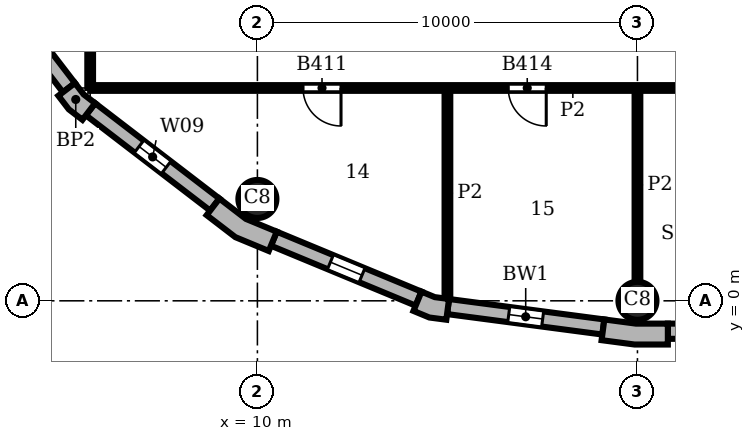
"""IFC4 building model, lengths in metres.
Left out: names, types, materials, properties, quantities, classifications, styles, units other than length and angle.
Written with IfcOpenShell. Run it as: python <this file> out.ifc"""

import sys

from ifc_helpers import new_model, si_unit, direction, frame, frame_2d, origin, origin_2d, place, context, subcontext, project, spatial, polyline, rectangle, circle, outline, extrude, element, fill, save


model = new_model("IFC4")
c1 = context("Model", 3, precision=1e-05, world=origin(), true_north=direction((0.0, 1.0)))
c2 = subcontext(c1, "Body", "Model", "MODEL_VIEW")
j1 = project(units=[si_unit("LENGTHUNIT", "METRE"), si_unit("PLANEANGLEUNIT", "RADIAN")], contexts=[c1])
p1 = place(None, origin())
s1 = spatial("IfcSite", under=j1, at=p1, CompositionType="ELEMENT")
p2 = place(p1, origin())
s2 = spatial("IfcBuilding", under=s1, at=p2, CompositionType="ELEMENT")
p3 = place(p2, frame((0.0, 0.0, 170.7)))
s3 = spatial("IfcBuildingStorey", under=s2, at=p3, CompositionType="ELEMENT", Elevation=170.7)
for number, where, z_axis, x_axis in (
    (1, (20.0, 0.0, 0.0), (0.0, 0.0, 1.0), (1.0, 0.0, 0.0)),
    (2, (10.0, 2.679, 0.0), (0.0, 0.0, 1.0), (1.0, 0.0, 0.0)),
):
    element("IfcColumn", number, at=place(p3, frame(where, z_axis=z_axis, x_axis=x_axis)), inside=s3, PredefinedType="COLUMN", context=c2, shape_type="SweptSolid", body=[
        extrude(circle(Radius=0.5, at=origin_2d()), origin(), (0.0, 0.0, 1.0), 3.9),
    ])
p4 = place(p3, origin())
e3 = element("IfcWall", 3, at=p4, inside=s3, PredefinedType="SOLIDWALL", context=c2, shape_type="SweptSolid", body=[
    extrude(outline(polyline([(19.076, -0.887), (19.057, -1.036), (19.925, -1.15), (20.8, -1.15), (20.8, -1.0), (20.8, -0.6), (19.961, -0.6), (19.128, -0.49), (19.076, -0.887)])), origin(), (0.0, 0.0, 1.0), 3.9),
])
e4 = element("IfcWall", 4, at=p4, inside=s3, PredefinedType="SOLIDWALL", context=c2, shape_type="SweptSolid", body=[
    extrude(outline(polyline([(4.882, 5.487), (4.763, 5.396), (5.038, 5.038), (5.396, 4.763), (5.487, 4.882), (5.731, 5.199), (5.43, 5.43), (5.199, 5.731), (4.882, 5.487)])), origin(), (0.0, 0.0, 1.0), 3.9),
])
e5 = element("IfcWall", 5, at=p4, inside=s3, PredefinedType="SOLIDWALL", context=c2, shape_type="SweptSolid", body=[
    extrude(outline(polyline([(8.757, 2.373), (8.665, 2.254), (9.42, 1.675), (10.299, 1.311), (10.356, 1.449), (10.51, 1.819), (9.698, 2.155), (9.0, 2.69), (8.757, 2.373)])), origin(), (0.0, 0.0, 1.0), 3.9),
])
e6 = element("IfcWall", 6, at=p4, inside=s3, PredefinedType="SOLIDWALL", context=c2, shape_type="SweptSolid", body=[
    extrude(outline(polyline([(14.164, -0.128), (14.106, -0.266), (14.523, -0.439), (14.971, -0.498), (14.99, -0.349), (15.043, 0.047), (14.667, 0.097), (14.317, 0.242), (14.164, -0.128)])), origin(), (0.0, 0.0, 1.0), 3.9),
])
p5 = place(p3, frame((20.8, -0.8, 0.0), z_axis=(0.0, 0.0, 1.0), x_axis=(1.0, 0.0, 0.0)))
e7 = element("IfcWall", 7, at=p5, inside=s3, PredefinedType="SOLIDWALL", context=c2, shape_type="SweptSolid", body=[
    extrude(rectangle(XDim=38.4, YDim=0.4, at=frame_2d((19.2, 0.0))), origin(), (0.0, 0.0, 1.0), 3.9),
])
p6 = place(p5, frame((3.75, 0.0, 0.9)))
e8 = element("IfcOpeningElement", 8, at=p6, cuts=e7, PredefinedType="OPENING", context=c2, shape_type="SweptSolid", body=[
    extrude(rectangle(XDim=0.9, YDim=2.35, at=frame_2d((0.45, 1.175))), frame((0.0, 0.21, 0.0), z_axis=(0.0, -1.0, 0.0), x_axis=(1.0, 0.0, 0.0)), (0.0, 0.0, 1.0), 0.42),
])
p7 = place(p5, frame((13.75, 0.0, 0.9)))
e9 = element("IfcOpeningElement", 9, at=p7, cuts=e7, PredefinedType="OPENING", context=c2, shape_type="SweptSolid", body=[
    extrude(rectangle(XDim=0.9, YDim=2.35, at=frame_2d((0.45, 1.175))), frame((0.0, 0.21, 0.0), z_axis=(0.0, -1.0, 0.0), x_axis=(1.0, 0.0, 0.0)), (0.0, 0.0, 1.0), 0.42),
])
p8 = place(p5, frame((23.75, 0.0, 0.9)))
e10 = element("IfcOpeningElement", 10, at=p8, cuts=e7, PredefinedType="OPENING", context=c2, shape_type="SweptSolid", body=[
    extrude(rectangle(XDim=0.9, YDim=2.35, at=frame_2d((0.45, 1.175))), frame((0.0, 0.21, 0.0), z_axis=(0.0, -1.0, 0.0), x_axis=(1.0, 0.0, 0.0)), (0.0, 0.0, 1.0), 0.42),
])
p9 = place(p5, frame((33.75, 0.0, 0.9)))
e11 = element("IfcOpeningElement", 11, at=p9, cuts=e7, PredefinedType="OPENING", context=c2, shape_type="SweptSolid", body=[
    extrude(rectangle(XDim=0.9, YDim=2.35, at=frame_2d((0.45, 1.175))), frame((0.0, 0.21, 0.0), z_axis=(0.0, -1.0, 0.0), x_axis=(1.0, 0.0, 0.0)), (0.0, 0.0, 1.0), 0.42),
])
p10 = place(p3, frame((2.532, 8.878, 0.0), z_axis=(0.0, 0.0, 1.0), x_axis=(0.608759824817, -0.793354571229, 0.0)))
e12 = element("IfcWall", 12, at=p10, inside=s3, PredefinedType="SOLIDWALL", context=c2, shape_type="SweptSolid", body=[
    extrude(rectangle(XDim=4.121, YDim=0.4, at=frame_2d((2.061, 0.0))), origin(), (0.0, 0.0, 1.0), 3.9),
])
p11 = place(p10, frame((1.611, 0.0, 0.9)))
e13 = element("IfcOpeningElement", 13, at=p11, cuts=e12, PredefinedType="OPENING", context=c2, shape_type="SweptSolid", body=[
    extrude(rectangle(XDim=0.9, YDim=2.35, at=frame_2d((0.45, 1.175))), frame((0.0, 0.21, 0.0), z_axis=(0.0, -1.0, 0.0), x_axis=(1.0, 0.0, 0.0)), (0.0, 0.0, 1.0), 0.42),
])
p12 = place(p3, frame((5.609, 5.041, 0.0), z_axis=(0.0, 0.0, 1.0), x_axis=(0.793354571229, -0.608759824817, 0.0)))
e14 = element("IfcWall", 14, at=p12, inside=s3, PredefinedType="SOLIDWALL", context=c2, shape_type="SweptSolid", body=[
    extrude(rectangle(XDim=4.121, YDim=0.4, at=frame_2d((2.061, 0.0))), origin(), (0.0, 0.0, 1.0), 3.9),
])
p13 = place(p12, frame((1.611, 0.0, 0.9)))
e15 = element("IfcOpeningElement", 15, at=p13, cuts=e14, PredefinedType="OPENING", context=c2, shape_type="SweptSolid", body=[
    extrude(rectangle(XDim=0.9, YDim=2.35, at=frame_2d((0.45, 1.175))), frame((0.0, 0.21, 0.0), z_axis=(0.0, -1.0, 0.0), x_axis=(1.0, 0.0, 0.0)), (0.0, 0.0, 1.0), 0.42),
])
p14 = place(p3, frame((10.433, 1.634, 0.0), z_axis=(0.0, 0.0, 1.0), x_axis=(0.923863744394, -0.382721546029, 0.0)))
e16 = element("IfcWall", 16, at=p14, inside=s3, PredefinedType="SOLIDWALL", context=c2, shape_type="SweptSolid", body=[
    extrude(rectangle(XDim=4.121, YDim=0.4, at=frame_2d((2.061, 0.0))), origin(), (0.0, 0.0, 1.0), 3.9),
])
p15 = place(p14, frame((1.611, 0.0, 0.9)))
e17 = element("IfcOpeningElement", 17, at=p15, cuts=e16, PredefinedType="OPENING", context=c2, shape_type="SweptSolid", body=[
    extrude(rectangle(XDim=0.9, YDim=2.35, at=frame_2d((0.45, 1.175))), frame((0.0, 0.21, 0.0), z_axis=(0.0, -1.0, 0.0), x_axis=(1.0, 0.0, 0.0)), (0.0, 0.0, 1.0), 0.42),
])
p16 = place(p3, frame((15.017, -0.151, 0.0), z_axis=(0.0, 0.0, 1.0), x_axis=(0.991446429508, -0.130514280502, 0.0)))
e18 = element("IfcWall", 18, at=p16, inside=s3, PredefinedType="SOLIDWALL", context=c2, shape_type="SweptSolid", body=[
    extrude(rectangle(XDim=4.121, YDim=0.4, at=frame_2d((2.061, 0.0))), origin(), (0.0, 0.0, 1.0), 3.9),
])
p17 = place(p16, frame((1.611, 0.0, 0.9)))
e19 = element("IfcOpeningElement", 19, at=p17, cuts=e18, PredefinedType="OPENING", context=c2, shape_type="SweptSolid", body=[
    extrude(rectangle(XDim=0.9, YDim=2.35, at=frame_2d((0.45, 1.175))), frame((0.0, 0.21, 0.0), z_axis=(0.0, -1.0, 0.0), x_axis=(1.0, 0.0, 0.0)), (0.0, 0.0, 1.0), 0.42),
])
p18 = place(p3, frame((5.6, 5.6, 0.0), z_axis=(0.0, 0.0, 1.0), x_axis=(0.0, 1.0, 0.0)))
e20 = element("IfcWall", 20, at=p18, inside=s3, PredefinedType="PARTITIONING", context=c2, shape_type="SweptSolid", body=[
    extrude(rectangle(XDim=22.4, YDim=0.15, at=frame_2d((11.2, 0.0))), origin(), (0.0, 0.0, 1.0), 3.58),
])
p19 = place(p18, frame((5.35, 0.0, 0.0)))
e21 = element("IfcOpeningElement", 21, at=p19, cuts=e20, PredefinedType="OPENING", context=c2, shape_type="SweptSolid", body=[
    extrude(rectangle(XDim=1.0, YDim=2.1, at=frame_2d((0.5, 1.05))), frame((0.0, 0.085, 0.0), z_axis=(0.0, -1.0, 0.0), x_axis=(1.0, 0.0, 0.0)), (0.0, 0.0, 1.0), 0.17),
])
p20 = place(p18, frame((11.25, 0.0, 0.0)))
e22 = element("IfcOpeningElement", 22, at=p20, cuts=e20, PredefinedType="OPENING", context=c2, shape_type="SweptSolid", body=[
    extrude(rectangle(XDim=1.0, YDim=2.1, at=frame_2d((0.5, 1.05))), frame((0.0, 0.085, 0.0), z_axis=(0.0, -1.0, 0.0), x_axis=(1.0, 0.0, 0.0)), (0.0, 0.0, 1.0), 0.17),
])
p21 = place(p18, frame((18.25, 0.0, 0.0)))
e23 = element("IfcOpeningElement", 23, at=p21, cuts=e20, PredefinedType="OPENING", context=c2, shape_type="SweptSolid", body=[
    extrude(rectangle(XDim=1.8, YDim=2.1, at=frame_2d((0.9, 1.05))), frame((0.0, 0.085, 0.0), z_axis=(0.0, -1.0, 0.0), x_axis=(1.0, 0.0, 0.0)), (0.0, 0.0, 1.0), 0.17),
])
p22 = place(p3, frame((15.0, 0.063, 0.0), z_axis=(0.0, 0.0, 1.0), x_axis=(0.0, 1.0, 0.0)))
e24 = element("IfcWall", 24, at=p22, inside=s3, PredefinedType="PARTITIONING", context=c2, shape_type="SweptSolid", body=[
    extrude(rectangle(XDim=5.537, YDim=0.15, at=frame_2d((2.769, 0.0))), origin(), (0.0, 0.0, 1.0), 3.58),
])
p23 = place(p3, frame((20.0, 0.5, 0.0), z_axis=(0.0, 0.0, 1.0), x_axis=(0.0, 1.0, 0.0)))
e25 = element("IfcWall", 25, at=p23, inside=s3, PredefinedType="PARTITIONING", context=c2, shape_type="SweptSolid", body=[
    extrude(rectangle(XDim=5.1, YDim=0.15, at=frame_2d((2.55, 0.0))), origin(), (0.0, 0.0, 1.0), 3.58),
])
p24 = place(p3, frame((5.6, 5.6, 0.0), z_axis=(0.0, 0.0, 1.0), x_axis=(1.0, 0.0, 0.0)))
e26 = element("IfcWall", 26, at=p24, inside=s3, PredefinedType="PARTITIONING", context=c2, shape_type="SweptSolid", body=[
    extrude(rectangle(XDim=25.4, YDim=0.15, at=frame_2d((12.7, 0.0))), origin(), (0.0, 0.0, 1.0), 3.58),
])
p25 = place(p24, frame((5.6, 0.0, 0.0)))
e27 = element("IfcOpeningElement", 27, at=p25, cuts=e26, PredefinedType="OPENING", context=c2, shape_type="SweptSolid", body=[
    extrude(rectangle(XDim=1.0, YDim=2.1, at=frame_2d((0.5, 1.05))), frame((0.0, 0.085, 0.0), z_axis=(0.0, -1.0, 0.0), x_axis=(1.0, 0.0, 0.0)), (0.0, 0.0, 1.0), 0.17),
])
p26 = place(p24, frame((11.0, 0.0, 0.0)))
e28 = element("IfcOpeningElement", 28, at=p26, cuts=e26, PredefinedType="OPENING", context=c2, shape_type="SweptSolid", body=[
    extrude(rectangle(XDim=1.0, YDim=2.1, at=frame_2d((0.5, 1.05))), frame((0.0, 0.085, 0.0), z_axis=(0.0, -1.0, 0.0), x_axis=(1.0, 0.0, 0.0)), (0.0, 0.0, 1.0), 0.17),
])
p27 = place(p24, frame((18.75, 0.0, 0.0)))
e29 = element("IfcOpeningElement", 29, at=p27, cuts=e26, PredefinedType="OPENING", context=c2, shape_type="SweptSolid", body=[
    extrude(rectangle(XDim=1.0, YDim=2.1, at=frame_2d((0.5, 1.05))), frame((0.0, 0.085, 0.0), z_axis=(0.0, -1.0, 0.0), x_axis=(1.0, 0.0, 0.0)), (0.0, 0.0, 1.0), 0.17),
])
p28 = place(p13, origin())
e30 = element("IfcWindow", 30, at=p28, inside=s3, PartitioningType="SINGLE_PANEL", PredefinedType="WINDOW", context=c2, shape_type="SweptSolid", body=[
    extrude(rectangle(XDim=0.9, YDim=2.35, at=frame_2d((0.45, 1.175))), frame((0.0, 0.16, 0.0), z_axis=(0.0, -1.0, 0.0), x_axis=(1.0, 0.0, 0.0)), (0.0, 0.0, 1.0), 0.06),
])
fill(e15, e30)
p29 = place(p15, origin())
e31 = element("IfcWindow", 31, at=p29, inside=s3, PartitioningType="SINGLE_PANEL", PredefinedType="WINDOW", context=c2, shape_type="SweptSolid", body=[
    extrude(rectangle(XDim=0.9, YDim=2.35, at=frame_2d((0.45, 1.175))), frame((0.0, 0.16, 0.0), z_axis=(0.0, -1.0, 0.0), x_axis=(1.0, 0.0, 0.0)), (0.0, 0.0, 1.0), 0.06),
])
fill(e17, e31)
p30 = place(p17, origin())
e32 = element("IfcWindow", 32, at=p30, inside=s3, PartitioningType="SINGLE_PANEL", PredefinedType="WINDOW", context=c2, shape_type="SweptSolid", body=[
    extrude(rectangle(XDim=0.9, YDim=2.35, at=frame_2d((0.45, 1.175))), frame((0.0, 0.16, 0.0), z_axis=(0.0, -1.0, 0.0), x_axis=(1.0, 0.0, 0.0)), (0.0, 0.0, 1.0), 0.06),
])
fill(e19, e32)
p31 = place(p25, frame((1.0, 0.0, 0.0), z_axis=(0.0, 0.0, 1.0), x_axis=(-1.0, 0.0, 0.0)))
e33 = element("IfcDoor", 33, at=p31, inside=s3, OperationType="SINGLE_SWING_LEFT", PredefinedType="DOOR", context=c2, shape_type="SweptSolid", body=[
    extrude(rectangle(XDim=1.0, YDim=2.1, at=frame_2d((0.5, 1.05))), frame((0.0, 0.025, 0.0), z_axis=(0.0, -1.0, 0.0), x_axis=(1.0, 0.0, 0.0)), (0.0, 0.0, 1.0), 0.05),
])
fill(e27, e33)
p32 = place(p26, frame((1.0, 0.0, 0.0), z_axis=(0.0, 0.0, 1.0), x_axis=(-1.0, 0.0, 0.0)))
e34 = element("IfcDoor", 34, at=p32, inside=s3, OperationType="SINGLE_SWING_LEFT", PredefinedType="DOOR", context=c2, shape_type="SweptSolid", body=[
    extrude(rectangle(XDim=1.0, YDim=2.1, at=frame_2d((0.5, 1.05))), frame((0.0, 0.025, 0.0), z_axis=(0.0, -1.0, 0.0), x_axis=(1.0, 0.0, 0.0)), (0.0, 0.0, 1.0), 0.05),
])
fill(e28, e34)
save(model, sys.argv[1])
